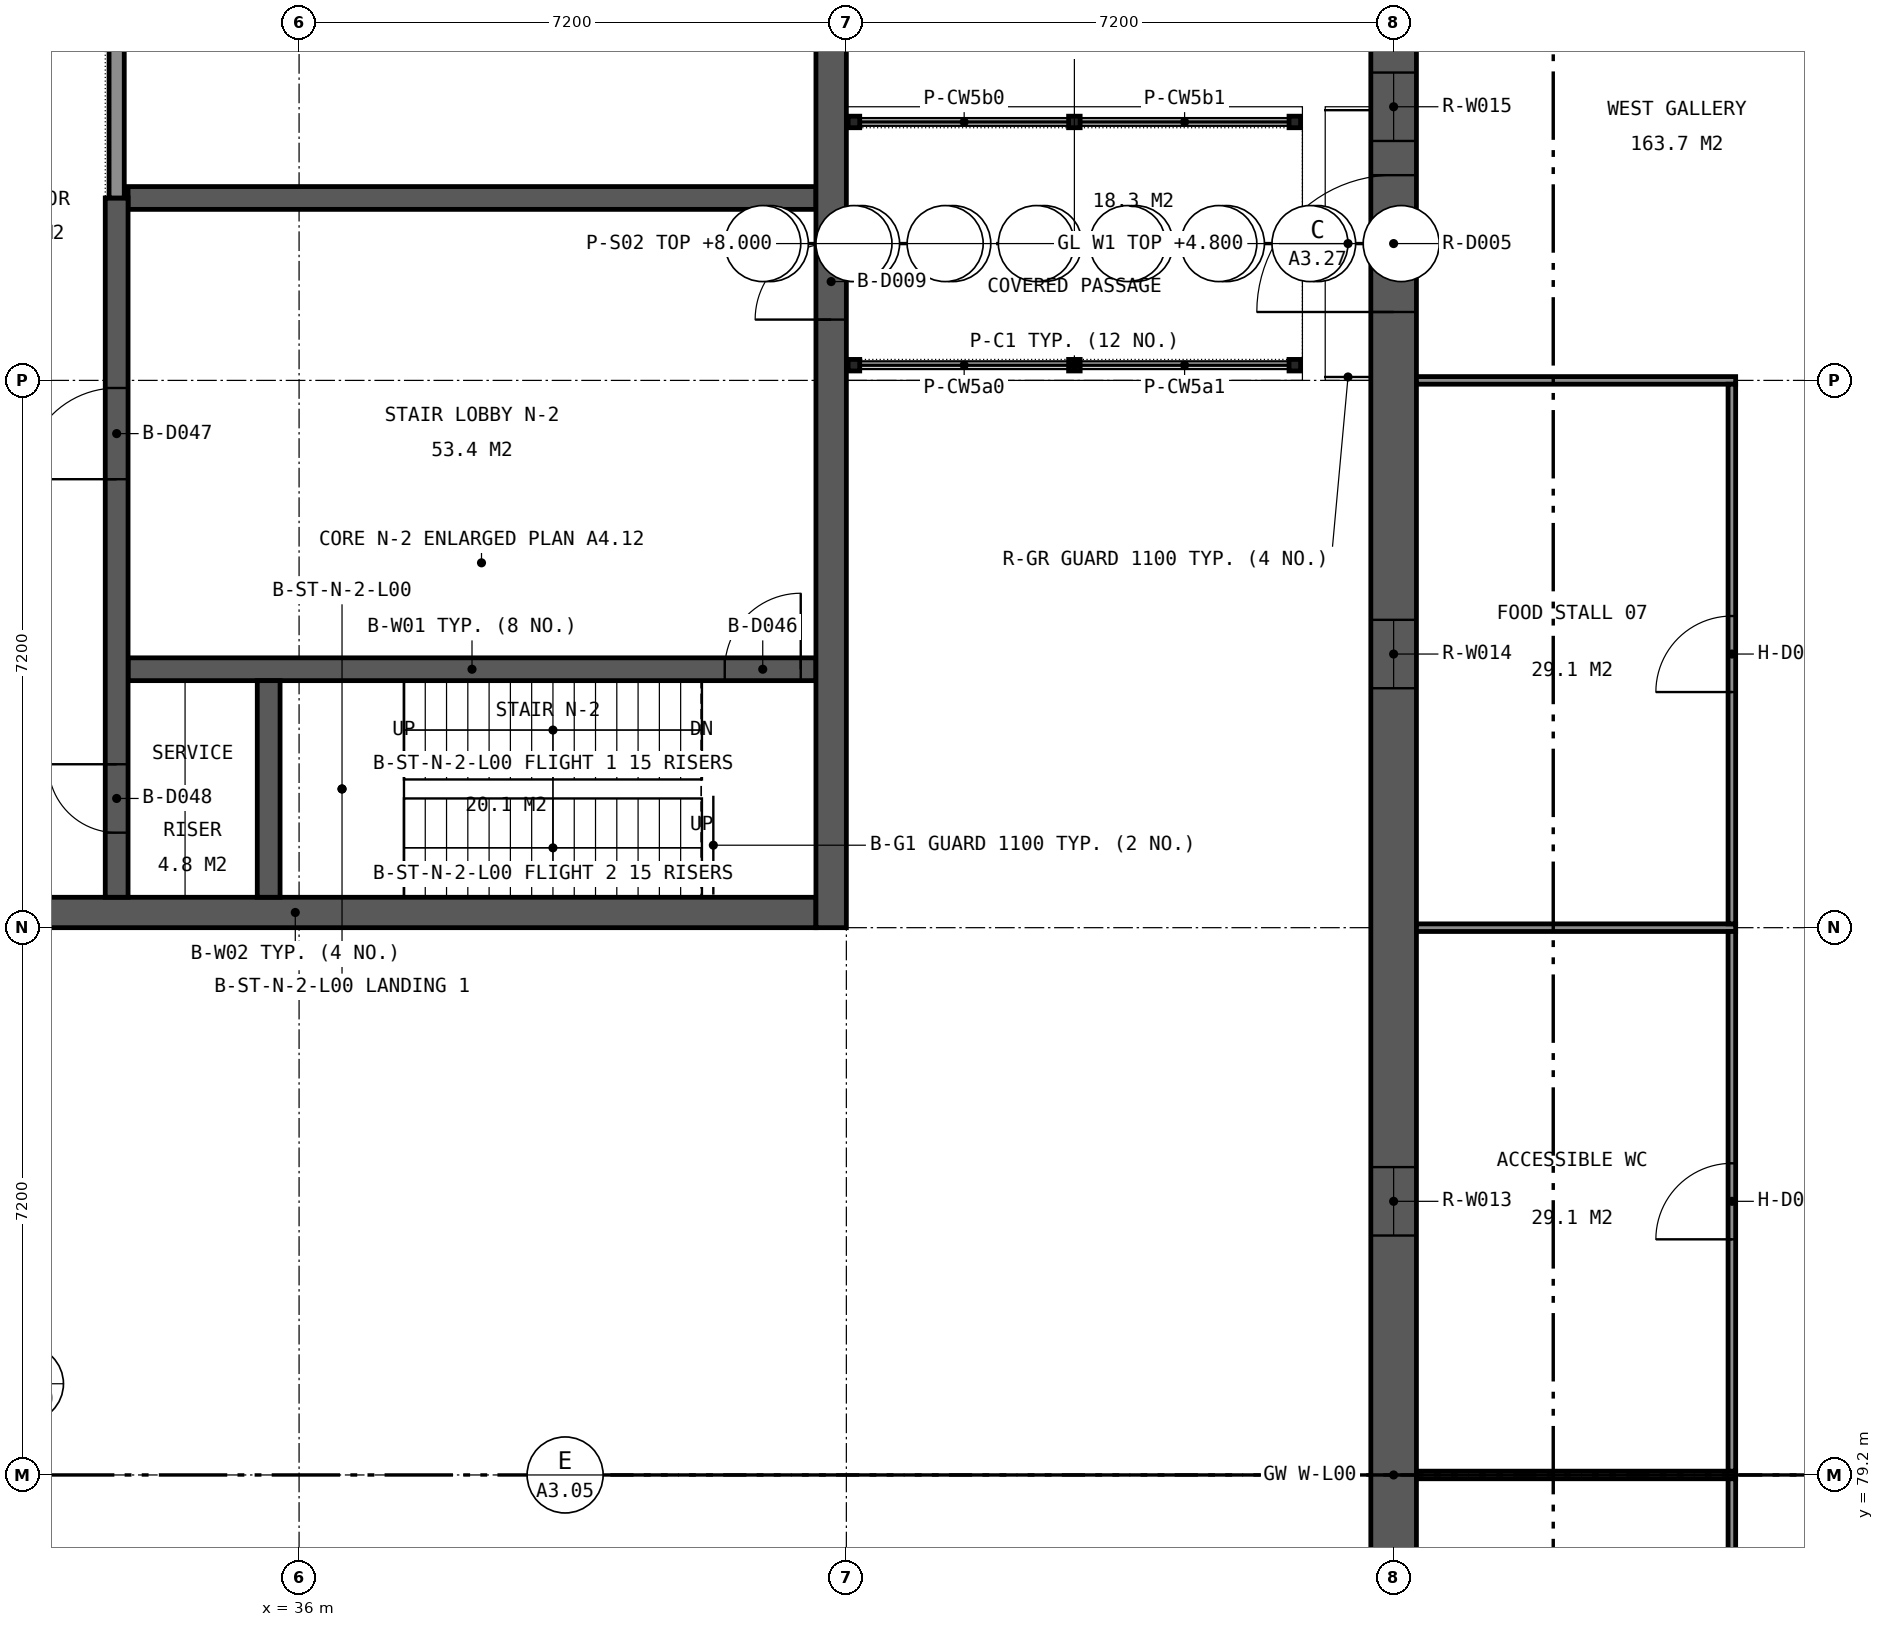
"""IFC4 building model, lengths in metres.
Left out: names, types, materials, properties, quantities, classifications, styles, units other than length and angle.
Written with IfcOpenShell. Run it as: python <this file> out.ifc"""

import sys

from ifc_helpers import new_model, si_unit, direction, frame, frame_2d, origin, origin_2d, place, context, subcontext, project, spatial, rectangle, hollow_rectangle, extrude, element, fill, save


model = new_model("IFC4")
c1 = context("Model", 3, precision=1e-05, world=origin(), true_north=direction((0.0, 1.0)))
c2 = subcontext(c1, "Body", "Model", "MODEL_VIEW")
j1 = project(units=[si_unit("LENGTHUNIT", "METRE"), si_unit("PLANEANGLEUNIT", "RADIAN")], contexts=[c1])
p1 = place(None, origin())
s1 = spatial("IfcSite", under=j1, at=p1, CompositionType="ELEMENT")
p2 = place(p1, origin())
s2 = spatial("IfcBuilding", under=s1, at=p2, CompositionType="ELEMENT")
p3 = place(p2, frame((0.0, 0.0, 4.8)))
s3 = spatial("IfcBuildingStorey", under=s2, at=p3, CompositionType="ELEMENT", Elevation=4.8)
p4 = place(p3, frame((50.4, 52.2, 0.0), z_axis=(0.0, 0.0, 1.0), x_axis=(0.0, 1.0, 0.0)))
e1 = element("IfcWall", 1, at=p4, inside=s3, PredefinedType="SOLIDWALL", context=c2, shape_type="SweptSolid", body=[
    extrude(rectangle(XDim=54.0, YDim=0.6, at=frame_2d((27.0, 0.0))), origin(), (0.0, 0.0, 1.0), 4.8),
])
p5 = place(p4, frame((1.35, 0.0, 0.9)))
e2 = element("IfcOpeningElement", 2, at=p5, cuts=e1, PredefinedType="OPENING", context=c2, shape_type="SweptSolid", body=[
    extrude(rectangle(XDim=0.9, YDim=3.3, at=frame_2d((0.45, 1.65))), frame((0.0, 0.31, 0.0), z_axis=(0.0, -1.0, 0.0), x_axis=(1.0, 0.0, 0.0)), (0.0, 0.0, 1.0), 0.62),
])
p6 = place(p4, frame((8.55, 0.0, 0.9)))
e3 = element("IfcOpeningElement", 3, at=p6, cuts=e1, PredefinedType="OPENING", context=c2, shape_type="SweptSolid", body=[
    extrude(rectangle(XDim=0.9, YDim=3.3, at=frame_2d((0.45, 1.65))), frame((0.0, 0.31, 0.0), z_axis=(0.0, -1.0, 0.0), x_axis=(1.0, 0.0, 0.0)), (0.0, 0.0, 1.0), 0.62),
])
p7 = place(p4, frame((15.75, 0.0, 0.9)))
e4 = element("IfcOpeningElement", 4, at=p7, cuts=e1, PredefinedType="OPENING", context=c2, shape_type="SweptSolid", body=[
    extrude(rectangle(XDim=0.9, YDim=3.3, at=frame_2d((0.45, 1.65))), frame((0.0, 0.31, 0.0), z_axis=(0.0, -1.0, 0.0), x_axis=(1.0, 0.0, 0.0)), (0.0, 0.0, 1.0), 0.62),
])
p8 = place(p4, frame((22.95, 0.0, 0.9)))
e5 = element("IfcOpeningElement", 5, at=p8, cuts=e1, PredefinedType="OPENING", context=c2, shape_type="SweptSolid", body=[
    extrude(rectangle(XDim=0.9, YDim=3.3, at=frame_2d((0.45, 1.65))), frame((0.0, 0.31, 0.0), z_axis=(0.0, -1.0, 0.0), x_axis=(1.0, 0.0, 0.0)), (0.0, 0.0, 1.0), 0.62),
])
p9 = place(p4, frame((30.15, 0.0, 0.9)))
e6 = element("IfcOpeningElement", 6, at=p9, cuts=e1, PredefinedType="OPENING", context=c2, shape_type="SweptSolid", body=[
    extrude(rectangle(XDim=0.9, YDim=3.3, at=frame_2d((0.45, 1.65))), frame((0.0, 0.31, 0.0), z_axis=(0.0, -1.0, 0.0), x_axis=(1.0, 0.0, 0.0)), (0.0, 0.0, 1.0), 0.62),
])
p10 = place(p4, frame((37.35, 0.0, 0.9)))
e7 = element("IfcOpeningElement", 7, at=p10, cuts=e1, PredefinedType="OPENING", context=c2, shape_type="SweptSolid", body=[
    extrude(rectangle(XDim=0.9, YDim=3.3, at=frame_2d((0.45, 1.65))), frame((0.0, 0.31, 0.0), z_axis=(0.0, -1.0, 0.0), x_axis=(1.0, 0.0, 0.0)), (0.0, 0.0, 1.0), 0.62),
])
p11 = place(p4, frame((44.55, 0.0, 0.9)))
e8 = element("IfcOpeningElement", 8, at=p11, cuts=e1, PredefinedType="OPENING", context=c2, shape_type="SweptSolid", body=[
    extrude(rectangle(XDim=0.9, YDim=3.3, at=frame_2d((0.45, 1.65))), frame((0.0, 0.31, 0.0), z_axis=(0.0, -1.0, 0.0), x_axis=(1.0, 0.0, 0.0)), (0.0, 0.0, 1.0), 0.62),
])
p12 = place(p4, frame((51.75, 0.0, 0.9)))
e9 = element("IfcOpeningElement", 9, at=p12, cuts=e1, PredefinedType="OPENING", context=c2, shape_type="SweptSolid", body=[
    extrude(rectangle(XDim=0.9, YDim=3.3, at=frame_2d((0.45, 1.65))), frame((0.0, 0.31, 0.0), z_axis=(0.0, -1.0, 0.0), x_axis=(1.0, 0.0, 0.0)), (0.0, 0.0, 1.0), 0.62),
])
p13 = place(p4, frame((9.9, 0.0, 0.0)))
e10 = element("IfcOpeningElement", 10, at=p13, cuts=e1, PredefinedType="OPENING", context=c2, shape_type="SweptSolid", body=[
    extrude(rectangle(XDim=1.8, YDim=2.4, at=frame_2d((0.9, 1.2))), frame((0.0, 0.31, 0.0), z_axis=(0.0, -1.0, 0.0), x_axis=(1.0, 0.0, 0.0)), (0.0, 0.0, 1.0), 0.62),
])
p14 = place(p4, frame((42.3, 0.0, 0.0)))
e11 = element("IfcOpeningElement", 11, at=p14, cuts=e1, PredefinedType="OPENING", context=c2, shape_type="SweptSolid", body=[
    extrude(rectangle(XDim=1.8, YDim=2.4, at=frame_2d((0.9, 1.2))), frame((0.0, 0.31, 0.0), z_axis=(0.0, -1.0, 0.0), x_axis=(1.0, 0.0, 0.0)), (0.0, 0.0, 1.0), 0.62),
])
p15 = place(p3, frame((29.1, 86.6, 0.0), z_axis=(0.0, 0.0, 1.0), x_axis=(1.0, 0.0, 0.0)))
e12 = element("IfcWall", 12, at=p15, inside=s3, PredefinedType="SHEAR", context=c2, shape_type="SweptSolid", body=[
    extrude(rectangle(XDim=13.7, YDim=0.4, at=frame_2d((6.85, 0.0))), origin(), (0.0, 0.0, 1.0), 4.55),
])
p16 = place(p3, frame((33.75, 89.8, 0.0), z_axis=(0.0, 0.0, 1.0), x_axis=(1.0, 0.0, 0.0)))
e13 = element("IfcWall", 13, at=p16, inside=s3, PredefinedType="SHEAR", context=c2, shape_type="SweptSolid", body=[
    extrude(rectangle(XDim=9.05, YDim=0.3, at=frame_2d((4.525, 0.0))), origin(), (0.0, 0.0, 1.0), 4.55),
])
p17 = place(p16, frame((7.85, 0.0, 0.0)))
e14 = element("IfcOpeningElement", 14, at=p17, cuts=e13, PredefinedType="OPENING", context=c2, shape_type="SweptSolid", body=[
    extrude(rectangle(XDim=1.0, YDim=2.1, at=frame_2d((0.5, 1.05))), frame((0.0, 0.16, 0.0), z_axis=(0.0, -1.0, 0.0), x_axis=(1.0, 0.0, 0.0)), (0.0, 0.0, 1.0), 0.32),
])
p18 = place(p3, frame((33.75, 96.0, 0.0), z_axis=(0.0, 0.0, 1.0), x_axis=(1.0, 0.0, 0.0)))
e15 = element("IfcWall", 15, at=p18, inside=s3, PredefinedType="SHEAR", context=c2, shape_type="SweptSolid", body=[
    extrude(rectangle(XDim=9.05, YDim=0.3, at=frame_2d((4.525, 0.0))), origin(), (0.0, 0.0, 1.0), 4.55),
])
p19 = place(p3, frame((33.6, 86.8, 0.0), z_axis=(0.0, 0.0, 1.0), x_axis=(0.0, 1.0, 0.0)))
e16 = element("IfcWall", 16, at=p19, inside=s3, PredefinedType="SHEAR", context=c2, shape_type="SweptSolid", body=[
    extrude(rectangle(XDim=9.2, YDim=0.3, at=frame_2d((4.6, 0.0))), origin(), (0.0, 0.0, 1.0), 4.55),
])
p20 = place(p19, frame((5.5, 0.0, 0.0)))
e17 = element("IfcOpeningElement", 17, at=p20, cuts=e16, PredefinedType="OPENING", context=c2, shape_type="SweptSolid", body=[
    extrude(rectangle(XDim=1.2, YDim=2.1, at=frame_2d((0.6, 1.05))), frame((0.0, 0.16, 0.0), z_axis=(0.0, -1.0, 0.0), x_axis=(1.0, 0.0, 0.0)), (0.0, 0.0, 1.0), 0.32),
])
p21 = place(p19, frame((0.85, 0.0, 0.0)))
e18 = element("IfcOpeningElement", 18, at=p21, cuts=e16, PredefinedType="OPENING", context=c2, shape_type="SweptSolid", body=[
    extrude(rectangle(XDim=0.9, YDim=2.1, at=frame_2d((0.45, 1.05))), frame((0.0, 0.16, 0.0), z_axis=(0.0, -1.0, 0.0), x_axis=(1.0, 0.0, 0.0)), (0.0, 0.0, 1.0), 0.32),
])
p22 = place(p3, frame((35.6, 86.8, 0.0), z_axis=(0.0, 0.0, 1.0), x_axis=(0.0, 1.0, 0.0)))
e19 = element("IfcWall", 19, at=p22, inside=s3, PredefinedType="SHEAR", context=c2, shape_type="SweptSolid", body=[
    extrude(rectangle(XDim=2.85, YDim=0.3, at=frame_2d((1.425, 0.0))), origin(), (0.0, 0.0, 1.0), 4.55),
])
p23 = place(p3, frame((43.0, 86.4, 0.0), z_axis=(0.0, 0.0, 1.0), x_axis=(0.0, 1.0, 0.0)))
e20 = element("IfcWall", 20, at=p23, inside=s3, PredefinedType="SHEAR", context=c2, shape_type="SweptSolid", body=[
    extrude(rectangle(XDim=14.1, YDim=0.4, at=frame_2d((7.05, 0.0))), origin(), (0.0, 0.0, 1.0), 4.55),
])
p24 = place(p23, frame((8.0, 0.0, 0.0)))
e21 = element("IfcOpeningElement", 21, at=p24, cuts=e20, PredefinedType="OPENING", context=c2, shape_type="SweptSolid", body=[
    extrude(rectangle(XDim=1.0, YDim=2.1, at=frame_2d((0.5, 1.05))), frame((0.0, 0.21, 0.0), z_axis=(0.0, -1.0, 0.0), x_axis=(1.0, 0.0, 0.0)), (0.0, 0.0, 1.0), 0.42),
])
for number, where, z_axis, x_axis in (
    (22, (43.3, 93.8, 0.0), (0.0, 0.0, 1.0), (1.0, 0.0, 0.0)),
    (23, (46.2, 93.8, 0.0), (0.0, 0.0, 1.0), (1.0, 0.0, 0.0)),
    (24, (49.1, 93.8, 0.0), (0.0, 0.0, 1.0), (1.0, 0.0, 0.0)),
    (25, (43.3, 97.0, 0.0), (0.0, 0.0, 1.0), (1.0, 0.0, 0.0)),
    (26, (46.2, 97.0, 0.0), (0.0, 0.0, 1.0), (1.0, 0.0, 0.0)),
    (27, (49.1, 97.0, 0.0), (0.0, 0.0, 1.0), (1.0, 0.0, 0.0)),
):
    element("IfcColumn", number, at=place(p3, frame(where, z_axis=z_axis, x_axis=x_axis)), inside=s3, PredefinedType="COLUMN", context=c2, shape_type="SweptSolid", body=[
        extrude(hollow_rectangle(XDim=0.152, YDim=0.152, WallThickness=0.01, at=origin_2d()), origin(), (0.0, 0.0, 1.0), 2.753),
    ])
for number, where, z_axis, x_axis in (
    (28, (50.7, 79.2, 0.0), (0.0, 0.0, 1.0), (1.0, 0.0, 0.0)),
    (29, (50.7, 86.4, 0.0), (0.0, 0.0, 1.0), (1.0, 0.0, 0.0)),
    (30, (50.7, 93.6, 0.0), (0.0, 0.0, 1.0), (1.0, 0.0, 0.0)),
):
    element("IfcWall", number, at=place(p3, frame(where, z_axis=z_axis, x_axis=x_axis)), inside=s3, PredefinedType="PARTITIONING", context=c2, shape_type="SweptSolid", body=[
        extrude(rectangle(XDim=4.2, YDim=0.1, at=frame_2d((2.1, 0.0))), origin(), (0.0, 0.0, 1.0), 3.95),
    ])
p25 = place(p3, frame((54.85, 72.05, 0.0), z_axis=(0.0, 0.0, 1.0), x_axis=(0.0, 1.0, 0.0)))
e31 = element("IfcWall", 31, at=p25, inside=s3, PredefinedType="PARTITIONING", context=c2, shape_type="SweptSolid", body=[
    extrude(rectangle(XDim=7.1, YDim=0.1, at=frame_2d((3.55, 0.0))), origin(), (0.0, 0.0, 1.0), 3.95),
])
p26 = place(p25, frame((3.1, 0.0, 0.0)))
e32 = element("IfcOpeningElement", 32, at=p26, cuts=e31, PredefinedType="OPENING", context=c2, shape_type="SweptSolid", body=[
    extrude(rectangle(XDim=0.9, YDim=2.1, at=frame_2d((0.45, 1.05))), frame((0.0, 0.06, 0.0), z_axis=(0.0, -1.0, 0.0), x_axis=(1.0, 0.0, 0.0)), (0.0, 0.0, 1.0), 0.12),
])
p27 = place(p3, frame((54.85, 79.25, 0.0), z_axis=(0.0, 0.0, 1.0), x_axis=(0.0, 1.0, 0.0)))
e33 = element("IfcWall", 33, at=p27, inside=s3, PredefinedType="PARTITIONING", context=c2, shape_type="SweptSolid", body=[
    extrude(rectangle(XDim=7.1, YDim=0.1, at=frame_2d((3.55, 0.0))), origin(), (0.0, 0.0, 1.0), 3.95),
])
p28 = place(p27, frame((3.05, 0.0, 0.0)))
e34 = element("IfcOpeningElement", 34, at=p28, cuts=e33, PredefinedType="OPENING", context=c2, shape_type="SweptSolid", body=[
    extrude(rectangle(XDim=1.0, YDim=2.1, at=frame_2d((0.5, 1.05))), frame((0.0, 0.06, 0.0), z_axis=(0.0, -1.0, 0.0), x_axis=(1.0, 0.0, 0.0)), (0.0, 0.0, 1.0), 0.12),
])
p29 = place(p3, frame((54.85, 86.45, 0.0), z_axis=(0.0, 0.0, 1.0), x_axis=(0.0, 1.0, 0.0)))
e35 = element("IfcWall", 35, at=p29, inside=s3, PredefinedType="PARTITIONING", context=c2, shape_type="SweptSolid", body=[
    extrude(rectangle(XDim=7.1, YDim=0.1, at=frame_2d((3.55, 0.0))), origin(), (0.0, 0.0, 1.0), 3.95),
])
p30 = place(p29, frame((3.05, 0.0, 0.0)))
e36 = element("IfcOpeningElement", 36, at=p30, cuts=e35, PredefinedType="OPENING", context=c2, shape_type="SweptSolid", body=[
    extrude(rectangle(XDim=1.0, YDim=2.1, at=frame_2d((0.5, 1.05))), frame((0.0, 0.06, 0.0), z_axis=(0.0, -1.0, 0.0), x_axis=(1.0, 0.0, 0.0)), (0.0, 0.0, 1.0), 0.12),
])
p31 = place(p3, frame((33.6, 96.0, 0.0), z_axis=(0.0, 0.0, 1.0), x_axis=(0.0, 1.0, 0.0)))
e37 = element("IfcWall", 37, at=p31, inside=s3, PredefinedType="PARTITIONING", context=c2, shape_type="SweptSolid", body=[
    extrude(rectangle(XDim=24.0, YDim=0.2, at=frame_2d((12.0, 0.0))), origin(), (0.0, 0.0, 1.0), 3.95),
])
p32 = place(p31, frame((17.1, 0.0, 0.0)))
e38 = element("IfcOpeningElement", 38, at=p32, cuts=e37, PredefinedType="OPENING", context=c2, shape_type="SweptSolid", body=[
    extrude(rectangle(XDim=1.8, YDim=2.1, at=frame_2d((0.9, 1.05))), frame((0.0, 0.11, 0.0), z_axis=(0.0, -1.0, 0.0), x_axis=(1.0, 0.0, 0.0)), (0.0, 0.0, 1.0), 0.22),
])
p33 = place(p31, frame((9.7, 0.0, 0.0)))
e39 = element("IfcOpeningElement", 39, at=p33, cuts=e37, PredefinedType="OPENING", context=c2, shape_type="SweptSolid", body=[
    extrude(rectangle(XDim=1.0, YDim=2.1, at=frame_2d((0.5, 1.05))), frame((0.0, 0.11, 0.0), z_axis=(0.0, -1.0, 0.0), x_axis=(1.0, 0.0, 0.0)), (0.0, 0.0, 1.0), 0.22),
])
p34 = place(p31, frame((3.3, 0.0, 0.0)))
e40 = element("IfcOpeningElement", 40, at=p34, cuts=e37, PredefinedType="OPENING", context=c2, shape_type="SweptSolid", body=[
    extrude(rectangle(XDim=1.8, YDim=2.1, at=frame_2d((0.9, 1.05))), frame((0.0, 0.11, 0.0), z_axis=(0.0, -1.0, 0.0), x_axis=(1.0, 0.0, 0.0)), (0.0, 0.0, 1.0), 0.22),
])
p35 = place(p9, origin())
e41 = element("IfcWindow", 41, at=p35, inside=s3, PartitioningType="SINGLE_PANEL", PredefinedType="WINDOW", context=c2, shape_type="SweptSolid", body=[
    extrude(rectangle(XDim=0.9, YDim=3.3, at=frame_2d((0.45, 1.65))), frame((0.0, 0.03, 0.0), z_axis=(0.0, -1.0, 0.0), x_axis=(1.0, 0.0, 0.0)), (0.0, 0.0, 1.0), 0.06),
])
fill(e6, e41)
p36 = place(p10, origin())
e42 = element("IfcWindow", 42, at=p36, inside=s3, PartitioningType="SINGLE_PANEL", PredefinedType="WINDOW", context=c2, shape_type="SweptSolid", body=[
    extrude(rectangle(XDim=0.9, YDim=3.3, at=frame_2d((0.45, 1.65))), frame((0.0, 0.03, 0.0), z_axis=(0.0, -1.0, 0.0), x_axis=(1.0, 0.0, 0.0)), (0.0, 0.0, 1.0), 0.06),
])
fill(e7, e42)
p37 = place(p11, origin())
e43 = element("IfcWindow", 43, at=p37, inside=s3, PartitioningType="SINGLE_PANEL", PredefinedType="WINDOW", context=c2, shape_type="SweptSolid", body=[
    extrude(rectangle(XDim=0.9, YDim=3.3, at=frame_2d((0.45, 1.65))), frame((0.0, 0.03, 0.0), z_axis=(0.0, -1.0, 0.0), x_axis=(1.0, 0.0, 0.0)), (0.0, 0.0, 1.0), 0.06),
])
fill(e8, e43)
p38 = place(p14, origin())
e44 = element("IfcDoor", 44, at=p38, inside=s3, OperationType="DOUBLE_DOOR_SINGLE_SWING", PredefinedType="DOOR", context=c2, shape_type="SweptSolid", body=[
    extrude(rectangle(XDim=1.8, YDim=2.4, at=frame_2d((0.9, 1.2))), frame((0.0, 0.025, 0.0), z_axis=(0.0, -1.0, 0.0), x_axis=(1.0, 0.0, 0.0)), (0.0, 0.0, 1.0), 0.05),
])
fill(e11, e44)
p39 = place(p24, origin())
e45 = element("IfcDoor", 45, at=p39, inside=s3, OperationType="SINGLE_SWING_LEFT", PredefinedType="DOOR", context=c2, shape_type="SweptSolid", body=[
    extrude(rectangle(XDim=1.0, YDim=2.1, at=frame_2d((0.5, 1.05))), frame((0.0, 0.025, 0.0), z_axis=(0.0, -1.0, 0.0), x_axis=(1.0, 0.0, 0.0)), (0.0, 0.0, 1.0), 0.05),
])
fill(e21, e45)
p40 = place(p28, origin())
e46 = element("IfcDoor", 46, at=p40, inside=s3, OperationType="SINGLE_SWING_LEFT", PredefinedType="DOOR", context=c2, shape_type="SweptSolid", body=[
    extrude(rectangle(XDim=1.0, YDim=2.1, at=frame_2d((0.5, 1.05))), frame((0.0, 0.025, 0.0), z_axis=(0.0, -1.0, 0.0), x_axis=(1.0, 0.0, 0.0)), (0.0, 0.0, 1.0), 0.05),
])
fill(e34, e46)
p41 = place(p30, origin())
e47 = element("IfcDoor", 47, at=p41, inside=s3, OperationType="SINGLE_SWING_LEFT", PredefinedType="DOOR", context=c2, shape_type="SweptSolid", body=[
    extrude(rectangle(XDim=1.0, YDim=2.1, at=frame_2d((0.5, 1.05))), frame((0.0, 0.025, 0.0), z_axis=(0.0, -1.0, 0.0), x_axis=(1.0, 0.0, 0.0)), (0.0, 0.0, 1.0), 0.05),
])
fill(e36, e47)
p42 = place(p17, origin())
e48 = element("IfcDoor", 48, at=p42, inside=s3, OperationType="SINGLE_SWING_RIGHT", PredefinedType="DOOR", context=c2, shape_type="SweptSolid", body=[
    extrude(rectangle(XDim=1.0, YDim=2.1, at=frame_2d((0.5, 1.05))), frame((0.0, 0.025, 0.0), z_axis=(0.0, -1.0, 0.0), x_axis=(1.0, 0.0, 0.0)), (0.0, 0.0, 1.0), 0.05),
])
fill(e14, e48)
p43 = place(p20, origin())
e49 = element("IfcDoor", 49, at=p43, inside=s3, OperationType="SINGLE_SWING_LEFT", PredefinedType="DOOR", context=c2, shape_type="SweptSolid", body=[
    extrude(rectangle(XDim=1.2, YDim=2.1, at=frame_2d((0.6, 1.05))), frame((0.0, 0.025, 0.0), z_axis=(0.0, -1.0, 0.0), x_axis=(1.0, 0.0, 0.0)), (0.0, 0.0, 1.0), 0.05),
])
fill(e17, e49)
p44 = place(p21, origin())
e50 = element("IfcDoor", 50, at=p44, inside=s3, OperationType="SINGLE_SWING_RIGHT", PredefinedType="DOOR", context=c2, shape_type="SweptSolid", body=[
    extrude(rectangle(XDim=0.9, YDim=2.1, at=frame_2d((0.45, 1.05))), frame((0.0, 0.025, 0.0), z_axis=(0.0, -1.0, 0.0), x_axis=(1.0, 0.0, 0.0)), (0.0, 0.0, 1.0), 0.05),
])
fill(e18, e50)
save(model, sys.argv[1])
